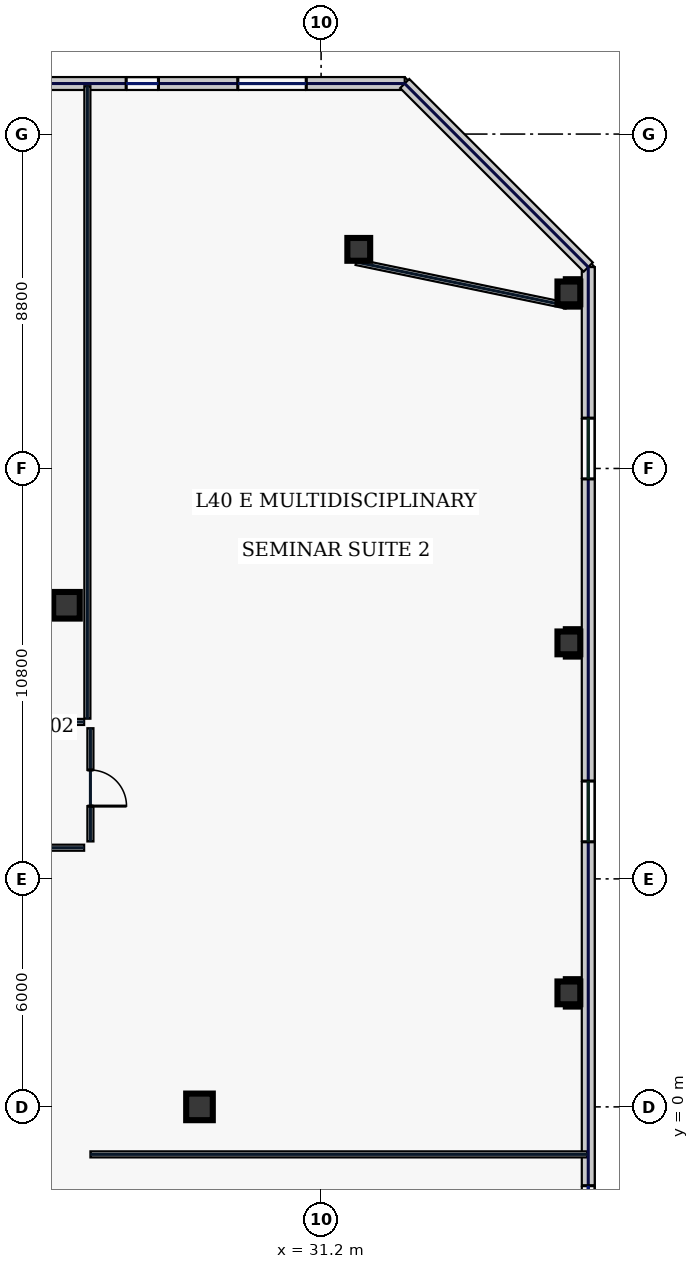
"""IFC4 building model, lengths in metres.
Left out: names, types, materials, properties, quantities, classifications, styles, units other than length and angle.
Written with IfcOpenShell. Run it as: python <this file> out.ifc"""

import sys

from ifc_helpers import new_model, si_unit, direction, frame, frame_2d, origin, origin_2d, place, context, subcontext, project, spatial, rectangle, hollow_rectangle, extrude, element, fill, save


model = new_model("IFC4")
c1 = context("Model", 3, precision=1e-05, world=origin(), true_north=direction((0.0, 1.0)))
c2 = subcontext(c1, "Body", "Model", "MODEL_VIEW")
j1 = project(units=[si_unit("LENGTHUNIT", "METRE"), si_unit("PLANEANGLEUNIT", "RADIAN")], contexts=[c1])
p1 = place(None, origin())
s1 = spatial("IfcSite", under=j1, at=p1, CompositionType="ELEMENT")
p2 = place(p1, origin())
s2 = spatial("IfcBuilding", under=s1, at=p2, CompositionType="ELEMENT")
p3 = place(p2, frame((0.0, 0.0, 176.2)))
s3 = spatial("IfcBuildingStorey", under=s2, at=p3, CompositionType="ELEMENT", Elevation=176.2)
for number, where, z_axis, x_axis in (
    (1, (24.5, 13.2, 0.0), (0.0, 0.0, 1.0), (1.0, 0.0, 0.0)),
    (2, (28.0, 0.0, 0.0), (0.0, 0.0, 1.0), (1.0, 0.0, 0.0)),
):
    element("IfcColumn", number, at=place(p3, frame(where, z_axis=z_axis, x_axis=x_axis)), inside=s3, PredefinedType="COLUMN", context=c2, shape_type="SweptSolid", body=[
        extrude(hollow_rectangle(XDim=0.7, YDim=0.7, WallThickness=0.032, at=origin_2d()), origin(), (0.0, 0.0, 1.0), 3.74),
    ])
for number, where, z_axis, x_axis in (
    (3, (32.191, 22.566, 0.0), (0.0, 0.0, 1.0), (1.0, 0.0, 0.0)),
    (4, (37.72, 3.0, 0.0), (0.0, 0.0, 1.0), (1.0, 0.0, 0.0)),
    (5, (37.72, 12.21, 0.0), (0.0, 0.0, 1.0), (1.0, 0.0, 0.0)),
    (6, (37.72, 21.42, 0.0), (0.0, 0.0, 1.0), (1.0, 0.0, 0.0)),
):
    element("IfcColumn", number, at=place(p3, frame(where, z_axis=z_axis, x_axis=x_axis)), inside=s3, PredefinedType="COLUMN", context=c2, shape_type="SweptSolid", body=[
        extrude(hollow_rectangle(XDim=0.6, YDim=0.6, WallThickness=0.028, at=origin_2d()), origin(), (0.0, 0.0, 1.0), 3.74),
    ])
p4 = place(p3, frame((33.4, 26.93, 0.0), z_axis=(0.0, 0.0, 1.0), x_axis=(-1.0, 0.0, 0.0)))
e7 = element("IfcWall", 7, at=p4, inside=s3, PredefinedType="STANDARD", context=c2, shape_type="SweptSolid", body=[
    extrude(rectangle(XDim=15.95, YDim=0.34, at=frame_2d((7.975, 0.0))), origin(), (0.0, 0.0, 1.0), 3.74),
])
p5 = place(p4, frame((11.071, 0.0, 0.7)))
e8 = element("IfcOpeningElement", 8, at=p5, cuts=e7, PredefinedType="OPENING", context=c2, shape_type="SweptSolid", body=[
    extrude(rectangle(XDim=1.8, YDim=2.2, at=frame_2d((0.9, 1.1))), frame((0.0, 0.18, 0.0), z_axis=(0.0, -1.0, 0.0), x_axis=(1.0, 0.0, 0.0)), (0.0, 0.0, 1.0), 0.36),
])
p6 = place(p4, frame((6.48, 0.0, 0.7)))
e9 = element("IfcOpeningElement", 9, at=p6, cuts=e7, PredefinedType="OPENING", context=c2, shape_type="SweptSolid", body=[
    extrude(rectangle(XDim=0.85, YDim=1.85, at=frame_2d((0.425, 0.925))), frame((0.0, 0.18, 0.0), z_axis=(0.0, -1.0, 0.0), x_axis=(1.0, 0.0, 0.0)), (0.0, 0.0, 1.0), 0.36),
])
p7 = place(p4, frame((2.591, 0.0, 0.7)))
e10 = element("IfcOpeningElement", 10, at=p7, cuts=e7, PredefinedType="OPENING", context=c2, shape_type="SweptSolid", body=[
    extrude(rectangle(XDim=1.8, YDim=2.2, at=frame_2d((0.9, 1.1))), frame((0.0, 0.18, 0.0), z_axis=(0.0, -1.0, 0.0), x_axis=(1.0, 0.0, 0.0)), (0.0, 0.0, 1.0), 0.36),
])
p8 = place(p3, frame((38.23, -16.1, 0.0), z_axis=(0.0, 0.0, 1.0), x_axis=(0.0, 1.0, 0.0)))
e11 = element("IfcWall", 11, at=p8, inside=s3, PredefinedType="STANDARD", context=c2, shape_type="SweptSolid", body=[
    extrude(rectangle(XDim=38.2, YDim=0.34, at=frame_2d((19.1, 0.0))), origin(), (0.0, 0.0, 1.0), 3.74),
])
p9 = place(p8, frame((3.975, 0.0, 0.58)))
e12 = element("IfcOpeningElement", 12, at=p9, cuts=e11, PredefinedType="OPENING", context=c2, shape_type="SweptSolid", body=[
    extrude(rectangle(XDim=1.6, YDim=2.3, at=frame_2d((0.8, 1.15))), frame((0.0, 0.18, 0.0), z_axis=(0.0, -1.0, 0.0), x_axis=(1.0, 0.0, 0.0)), (0.0, 0.0, 1.0), 0.36),
])
p10 = place(p8, frame((13.175, 0.0, 0.75)))
e13 = element("IfcOpeningElement", 13, at=p10, cuts=e11, PredefinedType="OPENING", context=c2, shape_type="SweptSolid", body=[
    extrude(rectangle(XDim=0.85, YDim=1.85, at=frame_2d((0.425, 0.925))), frame((0.0, 0.18, 0.0), z_axis=(0.0, -1.0, 0.0), x_axis=(1.0, 0.0, 0.0)), (0.0, 0.0, 1.0), 0.36),
])
p11 = place(p8, frame((23.075, 0.0, 0.58)))
e14 = element("IfcOpeningElement", 14, at=p11, cuts=e11, PredefinedType="OPENING", context=c2, shape_type="SweptSolid", body=[
    extrude(rectangle(XDim=1.6, YDim=2.3, at=frame_2d((0.8, 1.15))), frame((0.0, 0.18, 0.0), z_axis=(0.0, -1.0, 0.0), x_axis=(1.0, 0.0, 0.0)), (0.0, 0.0, 1.0), 0.36),
])
p12 = place(p8, frame((32.625, 0.0, 0.58)))
e15 = element("IfcOpeningElement", 15, at=p12, cuts=e11, PredefinedType="OPENING", context=c2, shape_type="SweptSolid", body=[
    extrude(rectangle(XDim=1.6, YDim=2.3, at=frame_2d((0.8, 1.15))), frame((0.0, 0.18, 0.0), z_axis=(0.0, -1.0, 0.0), x_axis=(1.0, 0.0, 0.0)), (0.0, 0.0, 1.0), 0.36),
])
p13 = place(p3, frame((38.23, 22.1, 0.0), z_axis=(0.0, 0.0, 1.0), x_axis=(-0.707124652085, 0.707088909836, 0.0)))
e16 = element("IfcWall", 16, at=p13, inside=s3, PredefinedType="STANDARD", context=c2, shape_type="SweptSolid", body=[
    extrude(rectangle(XDim=6.831, YDim=0.34, at=frame_2d((3.415, 0.0))), origin(), (0.0, 0.0, 1.0), 3.74),
])
p14 = place(p3, frame((37.651, 21.087, 0.0), z_axis=(0.0, 0.0, 1.0), x_axis=(-0.979184618318, 0.202971631636, 0.0)))
e17 = element("IfcWall", 17, at=p14, inside=s3, PredefinedType="PARTITIONING", context=c2, shape_type="SweptSolid", body=[
    extrude(rectangle(XDim=5.646, YDim=0.16, at=frame_2d((2.823, 0.0))), origin(), (0.0, 0.0, 1.0), 3.74),
])
p15 = place(p3, frame((-24.965, 10.13, 0.0), z_axis=(0.0, 0.0, 1.0), x_axis=(1.0, 0.0, 0.0)))
e18 = element("IfcWall", 18, at=p15, inside=s3, PredefinedType="PARTITIONING", context=c2, shape_type="SweptSolid", body=[
    extrude(rectangle(XDim=49.93, YDim=0.16, at=frame_2d((24.965, 0.0))), origin(), (0.0, 0.0, 1.0), 3.74),
])
p16 = place(p15, frame((2.667, 0.0, 0.0)))
e19 = element("IfcOpeningElement", 19, at=p16, cuts=e18, PredefinedType="OPENING", context=c2, shape_type="SweptSolid", body=[
    extrude(rectangle(XDim=0.95, YDim=2.2, at=frame_2d((0.475, 1.1))), frame((0.0, 0.09, 0.0), z_axis=(0.0, -1.0, 0.0), x_axis=(1.0, 0.0, 0.0)), (0.0, 0.0, 1.0), 0.18),
])
p17 = place(p15, frame((7.917, 0.0, 0.0)))
e20 = element("IfcOpeningElement", 20, at=p17, cuts=e18, PredefinedType="OPENING", context=c2, shape_type="SweptSolid", body=[
    extrude(rectangle(XDim=0.95, YDim=2.2, at=frame_2d((0.475, 1.1))), frame((0.0, 0.09, 0.0), z_axis=(0.0, -1.0, 0.0), x_axis=(1.0, 0.0, 0.0)), (0.0, 0.0, 1.0), 0.18),
])
p18 = place(p15, frame((14.73, 0.0, 0.0)))
e21 = element("IfcOpeningElement", 21, at=p18, cuts=e18, PredefinedType="OPENING", context=c2, shape_type="SweptSolid", body=[
    extrude(rectangle(XDim=0.95, YDim=2.2, at=frame_2d((0.475, 1.1))), frame((0.0, 0.09, 0.0), z_axis=(0.0, -1.0, 0.0), x_axis=(1.0, 0.0, 0.0)), (0.0, 0.0, 1.0), 0.18),
])
p19 = place(p15, frame((22.91, 0.0, 0.0)))
e22 = element("IfcOpeningElement", 22, at=p19, cuts=e18, PredefinedType="OPENING", context=c2, shape_type="SweptSolid", body=[
    extrude(rectangle(XDim=0.95, YDim=2.2, at=frame_2d((0.475, 1.1))), frame((0.0, 0.09, 0.0), z_axis=(0.0, -1.0, 0.0), x_axis=(1.0, 0.0, 0.0)), (0.0, 0.0, 1.0), 0.18),
])
p20 = place(p15, frame((31.3, 0.0, 0.0)))
e23 = element("IfcOpeningElement", 23, at=p20, cuts=e18, PredefinedType="OPENING", context=c2, shape_type="SweptSolid", body=[
    extrude(rectangle(XDim=1.05, YDim=2.2, at=frame_2d((0.525, 1.1))), frame((0.0, 0.09, 0.0), z_axis=(0.0, -1.0, 0.0), x_axis=(1.0, 0.0, 0.0)), (0.0, 0.0, 1.0), 0.18),
])
p21 = place(p15, frame((39.9, 0.0, 0.0)))
e24 = element("IfcOpeningElement", 24, at=p21, cuts=e18, PredefinedType="OPENING", context=c2, shape_type="SweptSolid", body=[
    extrude(rectangle(XDim=1.15, YDim=2.2, at=frame_2d((0.575, 1.1))), frame((0.0, 0.09, 0.0), z_axis=(0.0, -1.0, 0.0), x_axis=(1.0, 0.0, 0.0)), (0.0, 0.0, 1.0), 0.18),
])
p22 = place(p15, frame((46.606, 0.0, 0.0)))
e25 = element("IfcOpeningElement", 25, at=p22, cuts=e18, PredefinedType="OPENING", context=c2, shape_type="SweptSolid", body=[
    extrude(rectangle(XDim=0.95, YDim=2.2, at=frame_2d((0.475, 1.1))), frame((0.0, 0.09, 0.0), z_axis=(0.0, -1.0, 0.0), x_axis=(1.0, 0.0, 0.0)), (0.0, 0.0, 1.0), 0.18),
])
p23 = place(p3, frame((25.13, 9.965, 0.0), z_axis=(0.0, 0.0, 1.0), x_axis=(0.0, -1.0, 0.0)))
e26 = element("IfcWall", 26, at=p23, inside=s3, PredefinedType="PARTITIONING", context=c2, shape_type="SweptSolid", body=[
    extrude(rectangle(XDim=2.98, YDim=0.16, at=frame_2d((1.49, 0.0))), origin(), (0.0, 0.0, 1.0), 3.74),
])
p24 = place(p23, frame((1.1, 0.0, 0.0)))
e27 = element("IfcOpeningElement", 27, at=p24, cuts=e26, PredefinedType="OPENING", context=c2, shape_type="SweptSolid", body=[
    extrude(rectangle(XDim=0.95, YDim=2.2, at=frame_2d((0.475, 1.1))), frame((0.0, 0.09, 0.0), z_axis=(0.0, -1.0, 0.0), x_axis=(1.0, 0.0, 0.0)), (0.0, 0.0, 1.0), 0.18),
])
p25 = place(p3, frame((24.965, 6.82, 0.0), z_axis=(0.0, 0.0, 1.0), x_axis=(-1.0, 0.0, 0.0)))
e28 = element("IfcWall", 28, at=p25, inside=s3, PredefinedType="PARTITIONING", context=c2, shape_type="SweptSolid", body=[
    extrude(rectangle(XDim=14.335, YDim=0.16, at=frame_2d((7.167, 0.0))), origin(), (0.0, 0.0, 1.0), 3.74),
])
p26 = place(p3, frame((25.05, 10.215, 0.0), z_axis=(0.0, 0.0, 1.0), x_axis=(0.0, 1.0, 0.0)))
e29 = element("IfcWall", 29, at=p26, inside=s3, PredefinedType="PARTITIONING", context=c2, shape_type="SweptSolid", body=[
    extrude(rectangle(XDim=16.645, YDim=0.16, at=frame_2d((8.323, 0.0))), origin(), (0.0, 0.0, 1.0), 3.74),
])
p27 = place(p3, frame((25.13, -1.25, 0.0), z_axis=(0.0, 0.0, 1.0), x_axis=(1.0, 0.0, 0.0)))
e30 = element("IfcWall", 30, at=p27, inside=s3, PredefinedType="PARTITIONING", context=c2, shape_type="SweptSolid", body=[
    extrude(rectangle(XDim=13.08, YDim=0.16, at=frame_2d((6.54, 0.0))), origin(), (0.0, 0.0, 1.0), 3.74),
])
p28 = place(p6, origin())
e31 = element("IfcWindow", 31, at=p28, inside=s3, PartitioningType="SINGLE_PANEL", PredefinedType="WINDOW", context=c2, shape_type="SweptSolid", body=[
    extrude(rectangle(XDim=0.85, YDim=1.85, at=frame_2d((0.425, 0.925))), frame((0.0, 0.03, 0.0), z_axis=(0.0, -1.0, 0.0), x_axis=(1.0, 0.0, 0.0)), (0.0, 0.0, 1.0), 0.06),
])
fill(e9, e31)
p29 = place(p7, origin())
e32 = element("IfcWindow", 32, at=p29, inside=s3, PartitioningType="SINGLE_PANEL", PredefinedType="WINDOW", context=c2, shape_type="SweptSolid", body=[
    extrude(rectangle(XDim=1.8, YDim=2.2, at=frame_2d((0.9, 1.1))), frame((0.0, 0.03, 0.0), z_axis=(0.0, -1.0, 0.0), x_axis=(1.0, 0.0, 0.0)), (0.0, 0.0, 1.0), 0.06),
])
fill(e10, e32)
p30 = place(p10, origin())
e33 = element("IfcWindow", 33, at=p30, inside=s3, PartitioningType="SINGLE_PANEL", PredefinedType="WINDOW", context=c2, shape_type="SweptSolid", body=[
    extrude(rectangle(XDim=0.85, YDim=1.85, at=frame_2d((0.425, 0.925))), frame((0.0, 0.03, 0.0), z_axis=(0.0, -1.0, 0.0), x_axis=(1.0, 0.0, 0.0)), (0.0, 0.0, 1.0), 0.06),
])
fill(e13, e33)
p31 = place(p11, origin())
e34 = element("IfcWindow", 34, at=p31, inside=s3, PartitioningType="SINGLE_PANEL", PredefinedType="WINDOW", context=c2, shape_type="SweptSolid", body=[
    extrude(rectangle(XDim=1.6, YDim=2.3, at=frame_2d((0.8, 1.15))), frame((0.0, 0.03, 0.0), z_axis=(0.0, -1.0, 0.0), x_axis=(1.0, 0.0, 0.0)), (0.0, 0.0, 1.0), 0.06),
])
fill(e14, e34)
p32 = place(p12, origin())
e35 = element("IfcWindow", 35, at=p32, inside=s3, PartitioningType="SINGLE_PANEL", PredefinedType="WINDOW", context=c2, shape_type="SweptSolid", body=[
    extrude(rectangle(XDim=1.6, YDim=2.3, at=frame_2d((0.8, 1.15))), frame((0.0, 0.03, 0.0), z_axis=(0.0, -1.0, 0.0), x_axis=(1.0, 0.0, 0.0)), (0.0, 0.0, 1.0), 0.06),
])
fill(e15, e35)
p33 = place(p24, origin())
e36 = element("IfcDoor", 36, at=p33, inside=s3, OperationType="SINGLE_SWING_RIGHT", PredefinedType="DOOR", context=c2, shape_type="SweptSolid", body=[
    extrude(rectangle(XDim=0.95, YDim=2.2, at=frame_2d((0.475, 1.1))), frame((0.0, 0.025, 0.0), z_axis=(0.0, -1.0, 0.0), x_axis=(1.0, 0.0, 0.0)), (0.0, 0.0, 1.0), 0.05),
])
fill(e27, e36)
save(model, sys.argv[1])
